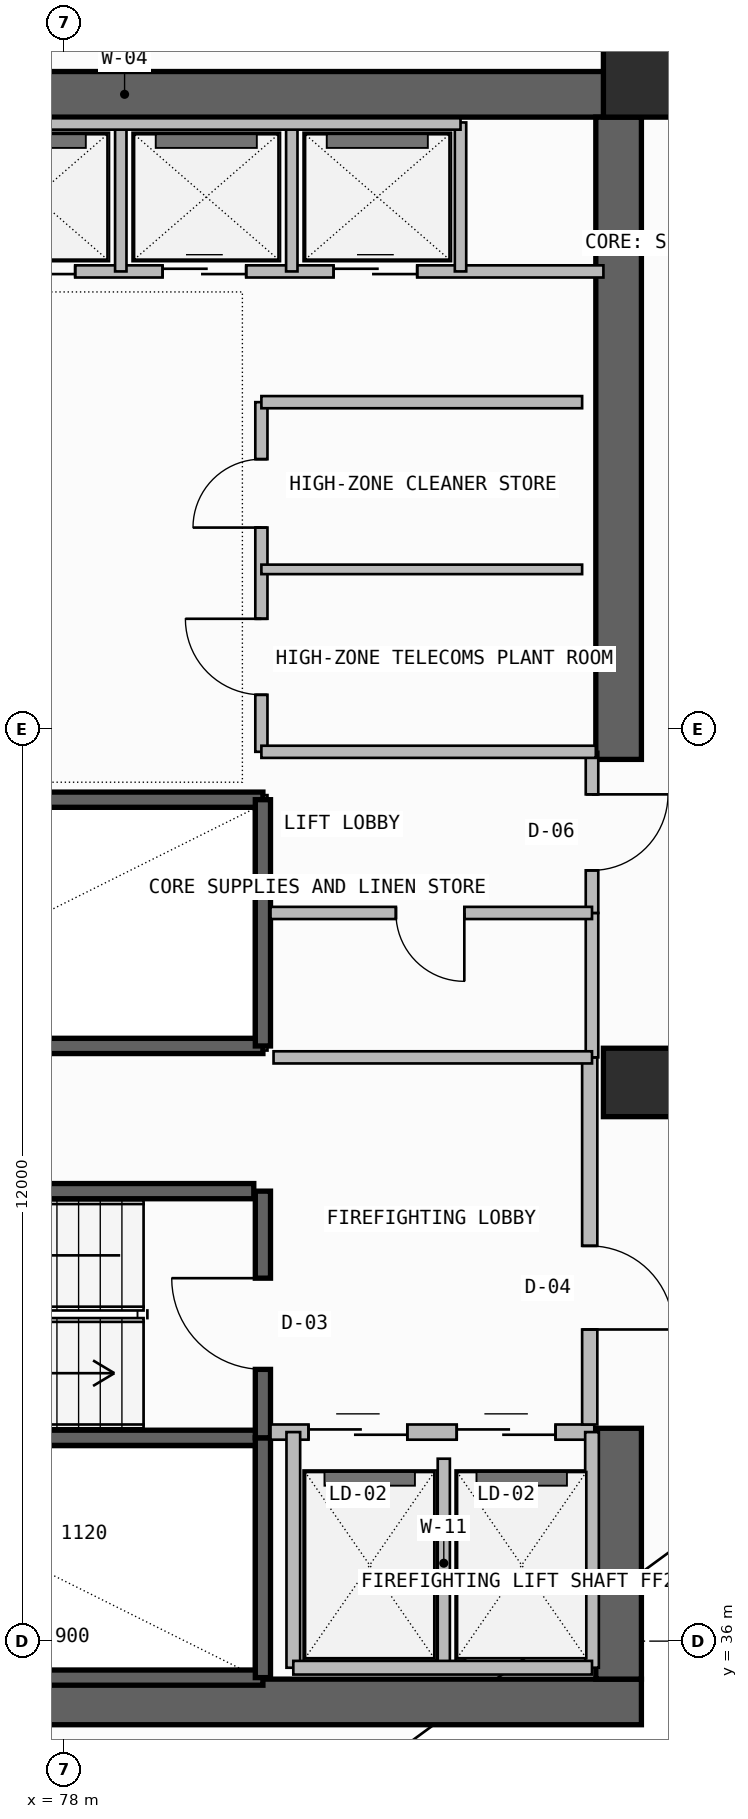
"""IFC4 building model, lengths in metres.
Left out: names, types, materials, properties, quantities, classifications, styles, units other than length and angle.
Written with IfcOpenShell. Run it as: python <this file> out.ifc"""

import sys

from ifc_helpers import new_model, si_unit, direction, frame, frame_2d, origin, origin_2d, place, context, subcontext, project, spatial, rectangle, extrude, element, fill, save


model = new_model("IFC4")
c1 = context("Model", 3, precision=1e-05, world=origin(), true_north=direction((0.0, 1.0)))
c2 = subcontext(c1, "Body", "Model", "MODEL_VIEW")
j1 = project(units=[si_unit("LENGTHUNIT", "METRE"), si_unit("PLANEANGLEUNIT", "RADIAN")], contexts=[c1])
p1 = place(None, origin())
s1 = spatial("IfcSite", under=j1, at=p1, CompositionType="ELEMENT")
p2 = place(p1, origin())
s2 = spatial("IfcBuilding", under=s1, at=p2, CompositionType="ELEMENT")
p3 = place(p2, frame((0.0, 0.0, 232.58)))
s3 = spatial("IfcBuildingStorey", under=s2, at=p3, CompositionType="ELEMENT", Elevation=232.58)
p4 = place(p3, frame((72.3, 35.2, -0.26), z_axis=(0.0, 0.0, 1.0), x_axis=(1.0, 0.0, 0.0)))
e1 = element("IfcWall", 1, at=p4, inside=s3, PredefinedType="SHEAR", context=c2, shape_type="SweptSolid", body=[
    extrude(rectangle(XDim=13.3, YDim=0.6, at=frame_2d((6.65, 0.0))), origin(), (0.0, 0.0, 1.0), 3.52),
])
p5 = place(p3, frame((85.3, 35.5, -0.26), z_axis=(0.0, 0.0, 1.0), x_axis=(0.0, 1.0, 0.0)))
e2 = element("IfcWall", 2, at=p5, inside=s3, PredefinedType="SHEAR", context=c2, shape_type="SweptSolid", body=[
    extrude(rectangle(XDim=3.3, YDim=0.6, at=frame_2d((1.65, 0.0))), origin(), (0.0, 0.0, 1.0), 3.52),
])
p6 = place(p3, frame((72.0, 56.35, -0.26), z_axis=(0.0, 0.0, 1.0), x_axis=(1.0, 0.0, 0.0)))
e3 = element("IfcWall", 3, at=p6, inside=s3, PredefinedType="SHEAR", context=c2, shape_type="SweptSolid", body=[
    extrude(rectangle(XDim=13.6, YDim=0.6, at=frame_2d((6.8, 0.0))), origin(), (0.0, 0.0, 1.0), 3.52),
])
p7 = place(p3, frame((85.3, 47.6, -0.26), z_axis=(0.0, 0.0, 1.0), x_axis=(0.0, 1.0, 0.0)))
e4 = element("IfcWall", 4, at=p7, inside=s3, PredefinedType="SHEAR", context=c2, shape_type="SweptSolid", body=[
    extrude(rectangle(XDim=8.45, YDim=0.6, at=frame_2d((4.225, 0.0))), origin(), (0.0, 0.0, 1.0), 3.52),
])
for number, where, z_axis, x_axis in (
    (5, (85.55, 43.35, 0.0), (0.0, 0.0, 1.0), (1.0, 0.0, 0.0)),
    (6, (85.55, 56.5, 0.0), (0.0, 0.0, 1.0), (1.0, 0.0, 0.0)),
):
    element("IfcColumn", number, at=place(p3, frame(where, z_axis=z_axis, x_axis=x_axis)), inside=s3, PredefinedType="COLUMN", context=c2, shape_type="SweptSolid", body=[
        extrude(rectangle(XDim=0.9, YDim=0.9, at=origin_2d()), origin(), (0.0, 0.0, 1.0), 3.52),
    ])
for number, where, z_axis, x_axis in (
    (7, (72.92, 35.52, -0.26), (0.0, 0.0, 1.0), (1.0, 0.0, 0.0)),
    (8, (72.92, 38.675, -0.26), (0.0, 0.0, 1.0), (1.0, 0.0, 0.0)),
):
    element("IfcWall", number, at=place(p3, frame(where, z_axis=z_axis, x_axis=x_axis)), inside=s3, PredefinedType="SOLIDWALL", context=c2, shape_type="SweptSolid", body=[
        extrude(rectangle(XDim=7.7, YDim=0.2, at=frame_2d((3.85, 0.0))), origin(), (0.0, 0.0, 1.0), 3.52),
    ])
p8 = place(p3, frame((80.62, 35.52, -0.26), z_axis=(0.0, 0.0, 1.0), x_axis=(0.0, 1.0, 0.0)))
e9 = element("IfcWall", 9, at=p8, inside=s3, PredefinedType="SOLIDWALL", context=c2, shape_type="SweptSolid", body=[
    extrude(rectangle(XDim=3.155, YDim=0.2, at=frame_2d((1.578, 0.0))), origin(), (0.0, 0.0, 1.0), 3.52),
])
p9 = place(p3, frame((80.62, 38.675, -0.26), z_axis=(0.0, 0.0, 1.0), x_axis=(0.0, 1.0, 0.0)))
e10 = element("IfcWall", 10, at=p9, inside=s3, PredefinedType="SOLIDWALL", context=c2, shape_type="SweptSolid", body=[
    extrude(rectangle(XDim=3.245, YDim=0.2, at=frame_2d((1.623, 0.0))), origin(), (0.0, 0.0, 1.0), 3.52),
])
p10 = place(p9, frame((0.9, 0.0, 0.26)))
e11 = element("IfcOpeningElement", 11, at=p10, cuts=e10, PredefinedType="OPENING", context=c2, shape_type="SweptSolid", body=[
    extrude(rectangle(XDim=1.2, YDim=2.2, at=frame_2d((0.6, 1.1))), frame((0.0, 0.11, 0.0), z_axis=(0.0, -1.0, 0.0), x_axis=(1.0, 0.0, 0.0)), (0.0, 0.0, 1.0), 0.22),
])
p11 = place(p3, frame((80.72, 38.75, 0.0), z_axis=(0.0, 0.0, 1.0), x_axis=(1.0, 0.0, 0.0)))
e12 = element("IfcWall", 12, at=p11, inside=s3, PredefinedType="SOLIDWALL", context=c2, shape_type="SweptSolid", body=[
    extrude(rectangle(XDim=4.26, YDim=0.2, at=frame_2d((2.13, 0.0))), origin(), (0.0, 0.0, 1.0), 3.26),
])
p12 = place(p11, frame((0.5, 0.0, 0.0)))
e13 = element("IfcOpeningElement", 13, at=p12, cuts=e12, PredefinedType="OPENING", context=c2, shape_type="SweptSolid", body=[
    extrude(rectangle(XDim=1.3, YDim=2.3, at=frame_2d((0.65, 1.15))), frame((0.0, 0.11, 0.0), z_axis=(0.0, -1.0, 0.0), x_axis=(1.0, 0.0, 0.0)), (0.0, 0.0, 1.0), 0.22),
])
p13 = place(p11, frame((2.45, 0.0, 0.0)))
e14 = element("IfcOpeningElement", 14, at=p13, cuts=e12, PredefinedType="OPENING", context=c2, shape_type="SweptSolid", body=[
    extrude(rectangle(XDim=1.3, YDim=2.3, at=frame_2d((0.65, 1.15))), frame((0.0, 0.11, 0.0), z_axis=(0.0, -1.0, 0.0), x_axis=(1.0, 0.0, 0.0)), (0.0, 0.0, 1.0), 0.22),
])
p14 = place(p3, frame((83.0, 35.65, 0.0), z_axis=(0.0, 0.0, 1.0), x_axis=(0.0, 1.0, 0.0)))
e15 = element("IfcWall", 15, at=p14, inside=s3, PredefinedType="PLUMBINGWALL", context=c2, shape_type="SweptSolid", body=[
    extrude(rectangle(XDim=2.75, YDim=0.16, at=frame_2d((1.375, 0.0))), origin(), (0.0, 0.0, 1.0), 3.26),
])
for number, where, z_axis, x_axis in (
    (16, (84.95, 35.65, 0.0), (0.0, 0.0, 1.0), (0.0, 1.0, 0.0)),
    (17, (81.02, 35.65, 0.0), (0.0, 0.0, 1.0), (0.0, 1.0, 0.0)),
):
    element("IfcWall", number, at=place(p3, frame(where, z_axis=z_axis, x_axis=x_axis)), inside=s3, PredefinedType="SOLIDWALL", context=c2, shape_type="SweptSolid", body=[
        extrude(rectangle(XDim=3.1, YDim=0.18, at=frame_2d((1.55, 0.0))), origin(), (0.0, 0.0, 1.0), 3.26),
    ])
p15 = place(p3, frame((81.02, 35.65, 0.0), z_axis=(0.0, 0.0, 1.0), x_axis=(1.0, 0.0, 0.0)))
e18 = element("IfcWall", 18, at=p15, inside=s3, PredefinedType="SOLIDWALL", context=c2, shape_type="SweptSolid", body=[
    extrude(rectangle(XDim=3.93, YDim=0.18, at=frame_2d((1.965, 0.0))), origin(), (0.0, 0.0, 1.0), 3.26),
])
p16 = place(p3, frame((84.92, 38.85, 0.0), z_axis=(0.0, 0.0, 1.0), x_axis=(0.0, 1.0, 0.0)))
e19 = element("IfcWall", 19, at=p16, inside=s3, PredefinedType="SOLIDWALL", context=c2, shape_type="SweptSolid", body=[
    extrude(rectangle(XDim=4.83, YDim=0.2, at=frame_2d((2.415, 0.0))), origin(), (0.0, 0.0, 1.0), 3.26),
])
p17 = place(p16, frame((1.25, 0.0, 0.0)))
e20 = element("IfcOpeningElement", 20, at=p17, cuts=e19, PredefinedType="OPENING", context=c2, shape_type="SweptSolid", body=[
    extrude(rectangle(XDim=1.1, YDim=2.2, at=frame_2d((0.55, 1.1))), frame((0.0, 0.11, 0.0), z_axis=(0.0, -1.0, 0.0), x_axis=(1.0, 0.0, 0.0)), (0.0, 0.0, 1.0), 0.22),
])
p18 = place(p3, frame((72.92, 41.92, -0.26), z_axis=(0.0, 0.0, 1.0), x_axis=(1.0, 0.0, 0.0)))
e21 = element("IfcWall", 21, at=p18, inside=s3, PredefinedType="SOLIDWALL", context=c2, shape_type="SweptSolid", body=[
    extrude(rectangle(XDim=7.58, YDim=0.2, at=frame_2d((3.79, 0.0))), origin(), (0.0, 0.0, 1.0), 3.52),
])
for number, where, z_axis, x_axis in (
    (22, (72.92, 43.83, -0.26), (0.0, 0.0, 1.0), (1.0, 0.0, 0.0)),
    (23, (72.92, 47.07, -0.26), (0.0, 0.0, 1.0), (1.0, 0.0, 0.0)),
):
    element("IfcWall", number, at=place(p3, frame(where, z_axis=z_axis, x_axis=x_axis)), inside=s3, PredefinedType="SOLIDWALL", context=c2, shape_type="SweptSolid", body=[
        extrude(rectangle(XDim=7.7, YDim=0.2, at=frame_2d((3.85, 0.0))), origin(), (0.0, 0.0, 1.0), 3.52),
    ])
p19 = place(p3, frame((80.62, 43.83, -0.26), z_axis=(0.0, 0.0, 1.0), x_axis=(0.0, 1.0, 0.0)))
e24 = element("IfcWall", 24, at=p19, inside=s3, PredefinedType="SOLIDWALL", context=c2, shape_type="SweptSolid", body=[
    extrude(rectangle(XDim=3.24, YDim=0.2, at=frame_2d((1.62, 0.0))), origin(), (0.0, 0.0, 1.0), 3.52),
])
p20 = place(p3, frame((84.95, 43.68, 0.0), z_axis=(0.0, 0.0, 1.0), x_axis=(0.0, 1.0, 0.0)))
e25 = element("IfcWall", 25, at=p20, inside=s3, PredefinedType="PLUMBINGWALL", context=c2, shape_type="SweptSolid", body=[
    extrude(rectangle(XDim=1.9, YDim=0.165, at=frame_2d((0.95, 0.0))), origin(), (0.0, 0.0, 1.0), 3.26),
])
p21 = place(p3, frame((84.95, 45.58, 0.0), z_axis=(0.0, 0.0, 1.0), x_axis=(0.0, 1.0, 0.0)))
e26 = element("IfcWall", 26, at=p21, inside=s3, PredefinedType="PARTITIONING", context=c2, shape_type="SweptSolid", body=[
    extrude(rectangle(XDim=2.12, YDim=0.165, at=frame_2d((1.06, 0.0))), origin(), (0.0, 0.0, 1.0), 3.26),
])
p22 = place(p21, frame((0.56, 0.0, 0.0)))
e27 = element("IfcOpeningElement", 27, at=p22, cuts=e26, PredefinedType="OPENING", context=c2, shape_type="SweptSolid", body=[
    extrude(rectangle(XDim=1.0, YDim=2.2, at=frame_2d((0.5, 1.1))), frame((0.0, 0.093, 0.0), z_axis=(0.0, -1.0, 0.0), x_axis=(1.0, 0.0, 0.0)), (0.0, 0.0, 1.0), 0.185),
])
p23 = place(p3, frame((80.72, 45.58, 0.0), z_axis=(0.0, 0.0, 1.0), x_axis=(1.0, 0.0, 0.0)))
e28 = element("IfcWall", 28, at=p23, inside=s3, PredefinedType="PLUMBINGWALL", context=c2, shape_type="SweptSolid", body=[
    extrude(rectangle(XDim=4.23, YDim=0.16, at=frame_2d((2.115, 0.0))), origin(), (0.0, 0.0, 1.0), 3.26),
])
p24 = place(p23, frame((1.65, 0.0, 0.0)))
e29 = element("IfcOpeningElement", 29, at=p24, cuts=e28, PredefinedType="OPENING", context=c2, shape_type="SweptSolid", body=[
    extrude(rectangle(XDim=0.9, YDim=2.1, at=frame_2d((0.45, 1.05))), frame((0.0, 0.09, 0.0), z_axis=(0.0, -1.0, 0.0), x_axis=(1.0, 0.0, 0.0)), (0.0, 0.0, 1.0), 0.18),
])
p25 = place(p3, frame((80.76, 43.68, 0.0), z_axis=(0.0, 0.0, 1.0), x_axis=(1.0, 0.0, 0.0)))
e30 = element("IfcWall", 30, at=p25, inside=s3, PredefinedType="PLUMBINGWALL", context=c2, shape_type="SweptSolid", body=[
    extrude(rectangle(XDim=4.19, YDim=0.16, at=frame_2d((2.095, 0.0))), origin(), (0.0, 0.0, 1.0), 3.26),
])
p26 = place(p3, frame((80.6, 47.7, 0.0), z_axis=(0.0, 0.0, 1.0), x_axis=(0.0, 1.0, 0.0)))
e31 = element("IfcWall", 31, at=p26, inside=s3, PredefinedType="SOLIDWALL", context=c2, shape_type="SweptSolid", body=[
    extrude(rectangle(XDim=4.6, YDim=0.16, at=frame_2d((2.3, 0.0))), origin(), (0.0, 0.0, 1.0), 3.26),
])
p27 = place(p26, frame((0.75, 0.0, 0.0)))
e32 = element("IfcOpeningElement", 32, at=p27, cuts=e31, PredefinedType="OPENING", context=c2, shape_type="SweptSolid", body=[
    extrude(rectangle(XDim=1.0, YDim=2.2, at=frame_2d((0.5, 1.1))), frame((0.0, 0.09, 0.0), z_axis=(0.0, -1.0, 0.0), x_axis=(1.0, 0.0, 0.0)), (0.0, 0.0, 1.0), 0.18),
])
p28 = place(p26, frame((2.95, 0.0, 0.0)))
e33 = element("IfcOpeningElement", 33, at=p28, cuts=e31, PredefinedType="OPENING", context=c2, shape_type="SweptSolid", body=[
    extrude(rectangle(XDim=0.9, YDim=2.1, at=frame_2d((0.45, 1.05))), frame((0.0, 0.09, 0.0), z_axis=(0.0, -1.0, 0.0), x_axis=(1.0, 0.0, 0.0)), (0.0, 0.0, 1.0), 0.18),
])
p29 = place(p3, frame((80.6, 47.7, 0.0), z_axis=(0.0, 0.0, 1.0), x_axis=(1.0, 0.0, 0.0)))
e34 = element("IfcWall", 34, at=p29, inside=s3, PredefinedType="SOLIDWALL", context=c2, shape_type="SweptSolid", body=[
    extrude(rectangle(XDim=4.4, YDim=0.16, at=frame_2d((2.2, 0.0))), origin(), (0.0, 0.0, 1.0), 3.26),
])
p30 = place(p3, frame((80.6, 52.3, 0.0), z_axis=(0.0, 0.0, 1.0), x_axis=(1.0, 0.0, 0.0)))
e35 = element("IfcWall", 35, at=p30, inside=s3, PredefinedType="SOLIDWALL", context=c2, shape_type="SweptSolid", body=[
    extrude(rectangle(XDim=4.22, YDim=0.16, at=frame_2d((2.11, 0.0))), origin(), (0.0, 0.0, 1.0), 3.26),
])
p31 = place(p3, frame((80.6, 50.1, 0.0), z_axis=(0.0, 0.0, 1.0), x_axis=(1.0, 0.0, 0.0)))
e36 = element("IfcWall", 36, at=p31, inside=s3, PredefinedType="PARTITIONING", context=c2, shape_type="SweptSolid", body=[
    extrude(rectangle(XDim=4.22, YDim=0.125, at=frame_2d((2.11, 0.0))), origin(), (0.0, 0.0, 1.0), 3.26),
])
p32 = place(p3, frame((73.02, 54.02, 0.0), z_axis=(0.0, 0.0, 1.0), x_axis=(1.0, 0.0, 0.0)))
e37 = element("IfcWall", 37, at=p32, inside=s3, PredefinedType="SOLIDWALL", context=c2, shape_type="SweptSolid", body=[
    extrude(rectangle(XDim=12.08, YDim=0.16, at=frame_2d((6.04, 0.0))), origin(), (0.0, 0.0, 1.0), 3.26),
])
p33 = place(p32, frame((4.03, 0.0, 0.0)))
e38 = element("IfcOpeningElement", 38, at=p33, cuts=e37, PredefinedType="OPENING", context=c2, shape_type="SweptSolid", body=[
    extrude(rectangle(XDim=1.1, YDim=2.25, at=frame_2d((0.55, 1.125))), frame((0.0, 0.09, 0.0), z_axis=(0.0, -1.0, 0.0), x_axis=(1.0, 0.0, 0.0)), (0.0, 0.0, 1.0), 0.18),
])
p34 = place(p32, frame((6.28, 0.0, 0.0)))
e39 = element("IfcOpeningElement", 39, at=p34, cuts=e37, PredefinedType="OPENING", context=c2, shape_type="SweptSolid", body=[
    extrude(rectangle(XDim=1.1, YDim=2.25, at=frame_2d((0.55, 1.125))), frame((0.0, 0.09, 0.0), z_axis=(0.0, -1.0, 0.0), x_axis=(1.0, 0.0, 0.0)), (0.0, 0.0, 1.0), 0.18),
])
p35 = place(p32, frame((8.53, 0.0, 0.0)))
e40 = element("IfcOpeningElement", 40, at=p35, cuts=e37, PredefinedType="OPENING", context=c2, shape_type="SweptSolid", body=[
    extrude(rectangle(XDim=1.1, YDim=2.25, at=frame_2d((0.55, 1.125))), frame((0.0, 0.09, 0.0), z_axis=(0.0, -1.0, 0.0), x_axis=(1.0, 0.0, 0.0)), (0.0, 0.0, 1.0), 0.18),
])
for number, where, z_axis, x_axis in (
    (41, (78.75, 54.02, 0.0), (0.0, 0.0, 1.0), (0.0, 1.0, 0.0)),
    (42, (81.0, 54.02, 0.0), (0.0, 0.0, 1.0), (0.0, 1.0, 0.0)),
):
    element("IfcWall", number, at=place(p3, frame(where, z_axis=z_axis, x_axis=x_axis)), inside=s3, PredefinedType="PLUMBINGWALL", context=c2, shape_type="SweptSolid", body=[
        extrude(rectangle(XDim=1.96, YDim=0.15, at=frame_2d((0.98, 0.0))), origin(), (0.0, 0.0, 1.0), 3.26),
    ])
p36 = place(p3, frame((83.22, 54.02, 0.0), z_axis=(0.0, 0.0, 1.0), x_axis=(0.0, 1.0, 0.0)))
e43 = element("IfcWall", 43, at=p36, inside=s3, PredefinedType="SOLIDWALL", context=c2, shape_type="SweptSolid", body=[
    extrude(rectangle(XDim=1.96, YDim=0.15, at=frame_2d((0.98, 0.0))), origin(), (0.0, 0.0, 1.0), 3.26),
])
p37 = place(p3, frame((76.52, 55.96, 0.0), z_axis=(0.0, 0.0, 1.0), x_axis=(1.0, 0.0, 0.0)))
e44 = element("IfcWall", 44, at=p37, inside=s3, PredefinedType="SOLIDWALL", context=c2, shape_type="SweptSolid", body=[
    extrude(rectangle(XDim=6.7, YDim=0.15, at=frame_2d((3.35, 0.0))), origin(), (0.0, 0.0, 1.0), 3.26),
])
p38 = place(p10, origin())
e45 = element("IfcDoor", 45, at=p38, inside=s3, OperationType="SINGLE_SWING_RIGHT", PredefinedType="USERDEFINED", context=c2, shape_type="SweptSolid", body=[
    extrude(rectangle(XDim=1.2, YDim=2.2, at=frame_2d((0.6, 1.1))), frame((0.0, 0.025, 0.0), z_axis=(0.0, -1.0, 0.0), x_axis=(1.0, 0.0, 0.0)), (0.0, 0.0, 1.0), 0.05),
])
fill(e11, e45)
p39 = place(p12, origin())
e46 = element("IfcDoor", 46, at=p39, inside=s3, OperationType="DOUBLE_DOOR_SLIDING", PredefinedType="DOOR", context=c2, shape_type="SweptSolid", body=[
    extrude(rectangle(XDim=1.3, YDim=2.3, at=frame_2d((0.65, 1.15))), frame((0.0, 0.025, 0.0), z_axis=(0.0, -1.0, 0.0), x_axis=(1.0, 0.0, 0.0)), (0.0, 0.0, 1.0), 0.05),
])
fill(e13, e46)
p40 = place(p13, origin())
e47 = element("IfcDoor", 47, at=p40, inside=s3, OperationType="DOUBLE_DOOR_SLIDING", PredefinedType="DOOR", context=c2, shape_type="SweptSolid", body=[
    extrude(rectangle(XDim=1.3, YDim=2.3, at=frame_2d((0.65, 1.15))), frame((0.0, 0.025, 0.0), z_axis=(0.0, -1.0, 0.0), x_axis=(1.0, 0.0, 0.0)), (0.0, 0.0, 1.0), 0.05),
])
fill(e14, e47)
p41 = place(p17, frame((1.1, 0.0, 0.0), z_axis=(0.0, 0.0, 1.0), x_axis=(-1.0, 0.0, 0.0)))
e48 = element("IfcDoor", 48, at=p41, inside=s3, OperationType="SINGLE_SWING_RIGHT", PredefinedType="DOOR", context=c2, shape_type="SweptSolid", body=[
    extrude(rectangle(XDim=1.1, YDim=2.2, at=frame_2d((0.55, 1.1))), frame((0.0, 0.025, 0.0), z_axis=(0.0, -1.0, 0.0), x_axis=(1.0, 0.0, 0.0)), (0.0, 0.0, 1.0), 0.05),
])
fill(e20, e48)
p42 = place(p22, frame((1.0, 0.0, 0.0), z_axis=(0.0, 0.0, 1.0), x_axis=(-1.0, 0.0, 0.0)))
e49 = element("IfcDoor", 49, at=p42, inside=s3, OperationType="SINGLE_SWING_LEFT", PredefinedType="DOOR", context=c2, shape_type="SweptSolid", body=[
    extrude(rectangle(XDim=1.0, YDim=2.2, at=frame_2d((0.5, 1.1))), frame((0.0, 0.025, 0.0), z_axis=(0.0, -1.0, 0.0), x_axis=(1.0, 0.0, 0.0)), (0.0, 0.0, 1.0), 0.05),
])
fill(e27, e49)
p43 = place(p24, frame((0.9, 0.0, 0.0), z_axis=(0.0, 0.0, 1.0), x_axis=(-1.0, 0.0, 0.0)))
e50 = element("IfcDoor", 50, at=p43, inside=s3, OperationType="SINGLE_SWING_LEFT", PredefinedType="DOOR", context=c2, shape_type="SweptSolid", body=[
    extrude(rectangle(XDim=0.9, YDim=2.1, at=frame_2d((0.45, 1.05))), frame((0.0, 0.025, 0.0), z_axis=(0.0, -1.0, 0.0), x_axis=(1.0, 0.0, 0.0)), (0.0, 0.0, 1.0), 0.05),
])
fill(e29, e50)
p44 = place(p27, origin())
e51 = element("IfcDoor", 51, at=p44, inside=s3, OperationType="SINGLE_SWING_RIGHT", PredefinedType="DOOR", context=c2, shape_type="SweptSolid", body=[
    extrude(rectangle(XDim=1.0, YDim=2.2, at=frame_2d((0.5, 1.1))), frame((0.0, 0.025, 0.0), z_axis=(0.0, -1.0, 0.0), x_axis=(1.0, 0.0, 0.0)), (0.0, 0.0, 1.0), 0.05),
])
fill(e32, e51)
p45 = place(p28, origin())
e52 = element("IfcDoor", 52, at=p45, inside=s3, OperationType="SINGLE_SWING_LEFT", PredefinedType="DOOR", context=c2, shape_type="SweptSolid", body=[
    extrude(rectangle(XDim=0.9, YDim=2.1, at=frame_2d((0.45, 1.05))), frame((0.0, 0.025, 0.0), z_axis=(0.0, -1.0, 0.0), x_axis=(1.0, 0.0, 0.0)), (0.0, 0.0, 1.0), 0.05),
])
fill(e33, e52)
p46 = place(p33, origin())
e53 = element("IfcDoor", 53, at=p46, inside=s3, OperationType="DOUBLE_DOOR_SLIDING", PredefinedType="DOOR", context=c2, shape_type="SweptSolid", body=[
    extrude(rectangle(XDim=1.1, YDim=2.25, at=frame_2d((0.55, 1.125))), frame((0.0, 0.025, 0.0), z_axis=(0.0, -1.0, 0.0), x_axis=(1.0, 0.0, 0.0)), (0.0, 0.0, 1.0), 0.05),
])
fill(e38, e53)
p47 = place(p34, origin())
e54 = element("IfcDoor", 54, at=p47, inside=s3, OperationType="DOUBLE_DOOR_SLIDING", PredefinedType="DOOR", context=c2, shape_type="SweptSolid", body=[
    extrude(rectangle(XDim=1.1, YDim=2.25, at=frame_2d((0.55, 1.125))), frame((0.0, 0.025, 0.0), z_axis=(0.0, -1.0, 0.0), x_axis=(1.0, 0.0, 0.0)), (0.0, 0.0, 1.0), 0.05),
])
fill(e39, e54)
p48 = place(p35, origin())
e55 = element("IfcDoor", 55, at=p48, inside=s3, OperationType="DOUBLE_DOOR_SLIDING", PredefinedType="DOOR", context=c2, shape_type="SweptSolid", body=[
    extrude(rectangle(XDim=1.1, YDim=2.25, at=frame_2d((0.55, 1.125))), frame((0.0, 0.025, 0.0), z_axis=(0.0, -1.0, 0.0), x_axis=(1.0, 0.0, 0.0)), (0.0, 0.0, 1.0), 0.05),
])
fill(e40, e55)
save(model, sys.argv[1])
